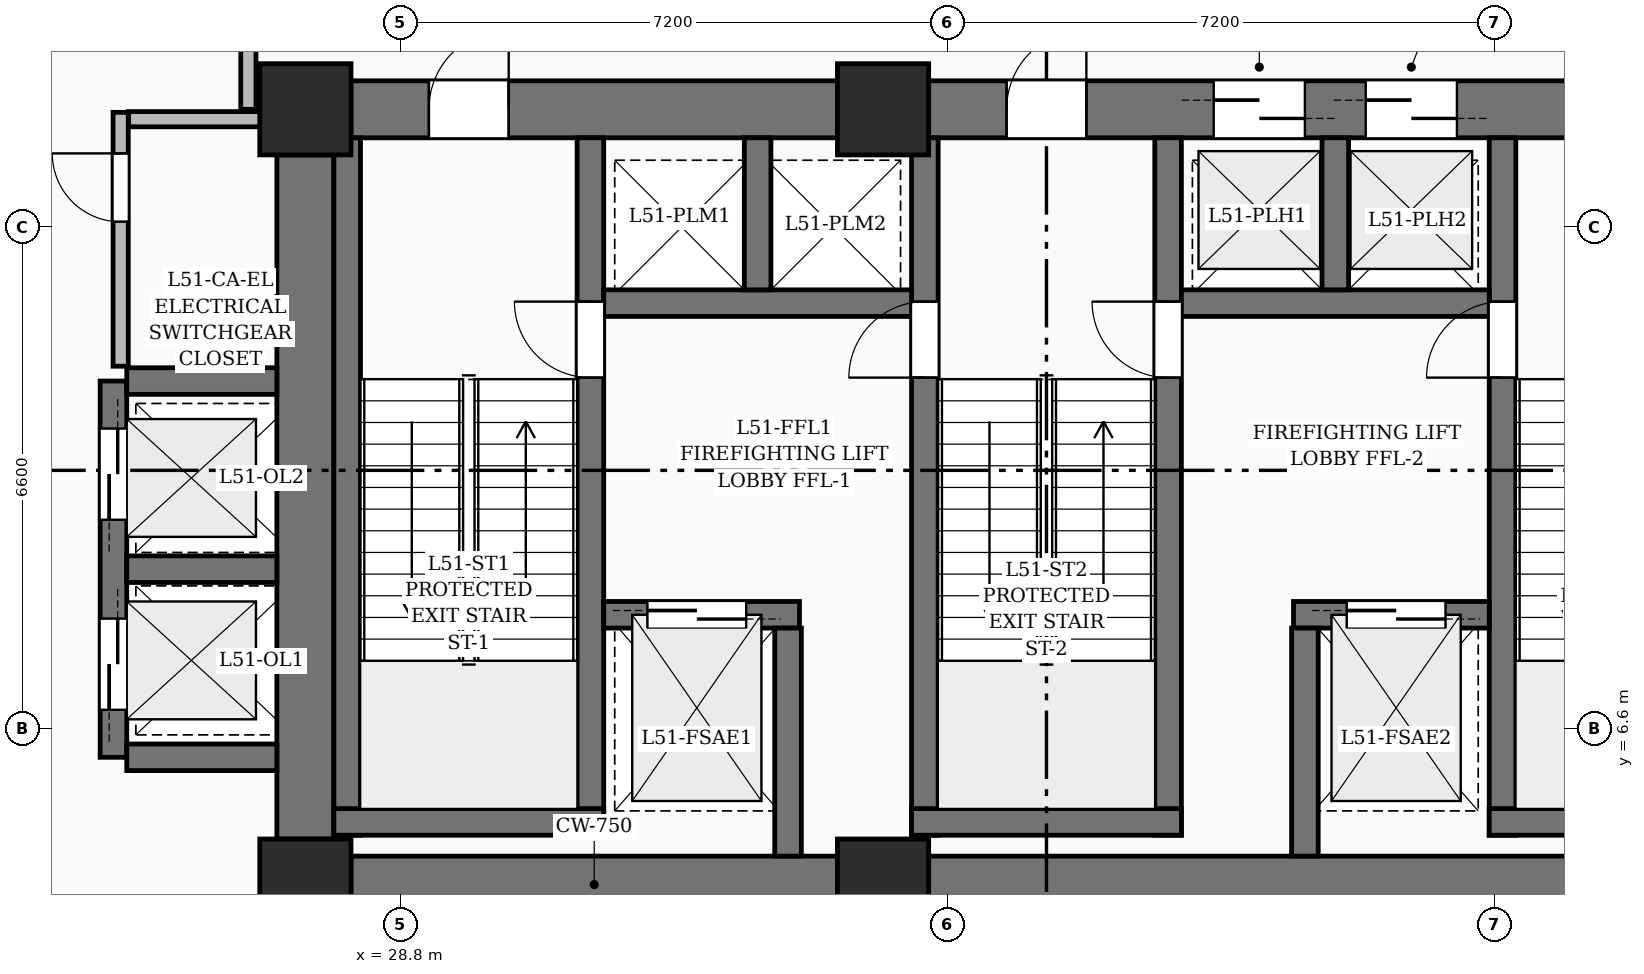
"""IFC4 building model, lengths in metres.
Left out: names, types, materials, properties, quantities, classifications, styles, units other than length and angle.
Written with IfcOpenShell. Run it as: python <this file> out.ifc"""

import sys

from ifc_helpers import new_model, si_unit, direction, frame, frame_2d, origin, origin_2d, place, context, subcontext, project, spatial, rectangle, extrude, element, fill, save


model = new_model("IFC4")
c1 = context("Model", 3, precision=1e-05, world=origin(), true_north=direction((0.0, 1.0)))
c2 = subcontext(c1, "Body", "Model", "MODEL_VIEW")
j1 = project(units=[si_unit("LENGTHUNIT", "METRE"), si_unit("PLANEANGLEUNIT", "RADIAN")], contexts=[c1])
p1 = place(None, origin())
s1 = spatial("IfcSite", under=j1, at=p1, CompositionType="ELEMENT")
p2 = place(p1, origin())
s2 = spatial("IfcBuilding", under=s1, at=p2, CompositionType="ELEMENT")
p3 = place(p2, frame((0.0, 0.0, 196.8)))
s3 = spatial("IfcBuildingStorey", under=s2, at=p3, CompositionType="ELEMENT", Elevation=196.8)
for number, where, z_axis, x_axis in (
    (1, (27.55, 4.55, 0.0), (0.0, 0.0, 1.0), (1.0, 0.0, 0.0)),
    (2, (35.15, 4.55, 0.0), (0.0, 0.0, 1.0), (1.0, 0.0, 0.0)),
    (3, (27.55, 14.75, 0.0), (0.0, 0.0, 1.0), (1.0, 0.0, 0.0)),
    (4, (35.15, 14.75, 0.0), (0.0, 0.0, 1.0), (1.0, 0.0, 0.0)),
):
    element("IfcColumn", number, at=place(p3, frame(where, z_axis=z_axis, x_axis=x_axis)), inside=s3, PredefinedType="COLUMN", context=c2, shape_type="SweptSolid", body=[
        extrude(rectangle(XDim=1.2, YDim=1.2, at=origin_2d()), origin(), (0.0, 0.0, 1.0), 4.8),
    ])
p4 = place(p3, frame((28.15, 4.55, 0.0), z_axis=(0.0, 0.0, 1.0), x_axis=(1.0, 0.0, 0.0)))
e5 = element("IfcWall", 5, at=p4, inside=s3, PredefinedType="SHEAR", context=c2, shape_type="SweptSolid", body=[
    extrude(rectangle(XDim=6.4, YDim=0.75, at=frame_2d((3.2, 0.0))), origin(), (0.0, 0.0, 1.0), 4.8),
])
p5 = place(p3, frame((35.75, 4.55, 0.0), z_axis=(0.0, 0.0, 1.0), x_axis=(1.0, 0.0, 0.0)))
e6 = element("IfcWall", 6, at=p5, inside=s3, PredefinedType="SHEAR", context=c2, shape_type="SweptSolid", body=[
    extrude(rectangle(XDim=10.7, YDim=0.75, at=frame_2d((5.35, 0.0))), origin(), (0.0, 0.0, 1.0), 4.8),
])
p6 = place(p3, frame((28.15, 14.75, 0.0), z_axis=(0.0, 0.0, 1.0), x_axis=(1.0, 0.0, 0.0)))
e7 = element("IfcWall", 7, at=p6, inside=s3, PredefinedType="SHEAR", context=c2, shape_type="SweptSolid", body=[
    extrude(rectangle(XDim=6.4, YDim=0.75, at=frame_2d((3.2, 0.0))), origin(), (0.0, 0.0, 1.0), 4.8),
])
p7 = place(p6, frame((1.025, 0.0, 0.0)))
e8 = element("IfcOpeningElement", 8, at=p7, cuts=e7, PredefinedType="OPENING", context=c2, shape_type="SweptSolid", body=[
    extrude(rectangle(XDim=1.05, YDim=2.15, at=frame_2d((0.525, 1.075))), frame((0.0, 0.385, 0.0), z_axis=(0.0, -1.0, 0.0), x_axis=(1.0, 0.0, 0.0)), (0.0, 0.0, 1.0), 0.77),
])
p8 = place(p3, frame((35.75, 14.75, 0.0), z_axis=(0.0, 0.0, 1.0), x_axis=(1.0, 0.0, 0.0)))
e9 = element("IfcWall", 9, at=p8, inside=s3, PredefinedType="SHEAR", context=c2, shape_type="SweptSolid", body=[
    extrude(rectangle(XDim=10.7, YDim=0.75, at=frame_2d((5.35, 0.0))), origin(), (0.0, 0.0, 1.0), 4.8),
])
p9 = place(p8, frame((1.025, 0.0, 0.0)))
e10 = element("IfcOpeningElement", 10, at=p9, cuts=e9, PredefinedType="OPENING", context=c2, shape_type="SweptSolid", body=[
    extrude(rectangle(XDim=1.05, YDim=2.15, at=frame_2d((0.525, 1.075))), frame((0.0, 0.385, 0.0), z_axis=(0.0, -1.0, 0.0), x_axis=(1.0, 0.0, 0.0)), (0.0, 0.0, 1.0), 0.77),
])
p10 = place(p8, frame((8.625, 0.0, 0.0)))
e11 = element("IfcOpeningElement", 11, at=p10, cuts=e9, PredefinedType="OPENING", context=c2, shape_type="SweptSolid", body=[
    extrude(rectangle(XDim=1.05, YDim=2.15, at=frame_2d((0.525, 1.075))), frame((0.0, 0.385, 0.0), z_axis=(0.0, -1.0, 0.0), x_axis=(1.0, 0.0, 0.0)), (0.0, 0.0, 1.0), 0.77),
])
p11 = place(p8, frame((3.75, 0.0, 0.0)))
e12 = element("IfcOpeningElement", 12, at=p11, cuts=e9, PredefinedType="OPENING", context=c2, shape_type="SweptSolid", body=[
    extrude(rectangle(XDim=1.2, YDim=2.2, at=frame_2d((0.6, 1.1))), frame((0.0, 0.385, 0.0), z_axis=(0.0, -1.0, 0.0), x_axis=(1.0, 0.0, 0.0)), (0.0, 0.0, 1.0), 0.77),
])
p12 = place(p8, frame((5.75, 0.0, 0.0)))
e13 = element("IfcOpeningElement", 13, at=p12, cuts=e9, PredefinedType="OPENING", context=c2, shape_type="SweptSolid", body=[
    extrude(rectangle(XDim=1.2, YDim=2.2, at=frame_2d((0.6, 1.1))), frame((0.0, 0.385, 0.0), z_axis=(0.0, -1.0, 0.0), x_axis=(1.0, 0.0, 0.0)), (0.0, 0.0, 1.0), 0.77),
])
p13 = place(p3, frame((27.55, 5.15, 0.0), z_axis=(0.0, 0.0, 1.0), x_axis=(0.0, 1.0, 0.0)))
e14 = element("IfcWall", 14, at=p13, inside=s3, PredefinedType="SHEAR", context=c2, shape_type="SweptSolid", body=[
    extrude(rectangle(XDim=9.0, YDim=0.75, at=frame_2d((4.5, 0.0))), origin(), (0.0, 0.0, 1.0), 4.8),
])
p14 = place(p3, frame((28.1, 5.2, 0.0), z_axis=(0.0, 0.0, 1.0), x_axis=(0.0, 1.0, 0.0)))
e15 = element("IfcWall", 15, at=p14, inside=s3, PredefinedType="SOLIDWALL", context=c2, shape_type="SweptSolid", body=[
    extrude(rectangle(XDim=9.175, YDim=0.35, at=frame_2d((4.587, 0.0))), origin(), (0.0, 0.0, 1.0), 4.8),
])
p15 = place(p3, frame((31.3, 5.2, 0.0), z_axis=(0.0, 0.0, 1.0), x_axis=(0.0, 1.0, 0.0)))
e16 = element("IfcWall", 16, at=p15, inside=s3, PredefinedType="SOLIDWALL", context=c2, shape_type="SweptSolid", body=[
    extrude(rectangle(XDim=9.175, YDim=0.35, at=frame_2d((4.587, 0.0))), origin(), (0.0, 0.0, 1.0), 4.8),
])
p16 = place(p15, frame((6.02, 0.0, 0.0)))
e17 = element("IfcOpeningElement", 17, at=p16, cuts=e16, PredefinedType="OPENING", context=c2, shape_type="SweptSolid", body=[
    extrude(rectangle(XDim=1.0, YDim=2.15, at=frame_2d((0.5, 1.075))), frame((0.0, 0.185, 0.0), z_axis=(0.0, -1.0, 0.0), x_axis=(1.0, 0.0, 0.0)), (0.0, 0.0, 1.0), 0.37),
])
p17 = place(p3, frame((27.925, 5.375, 0.0), z_axis=(0.0, 0.0, 1.0), x_axis=(1.0, 0.0, 0.0)))
e18 = element("IfcWall", 18, at=p17, inside=s3, PredefinedType="SOLIDWALL", context=c2, shape_type="SweptSolid", body=[
    extrude(rectangle(XDim=3.55, YDim=0.35, at=frame_2d((1.775, 0.0))), origin(), (0.0, 0.0, 1.0), 4.8),
])
p18 = place(p3, frame((35.7, 5.2, 0.0), z_axis=(0.0, 0.0, 1.0), x_axis=(0.0, 1.0, 0.0)))
e19 = element("IfcWall", 19, at=p18, inside=s3, PredefinedType="SOLIDWALL", context=c2, shape_type="SweptSolid", body=[
    extrude(rectangle(XDim=9.175, YDim=0.35, at=frame_2d((4.587, 0.0))), origin(), (0.0, 0.0, 1.0), 4.8),
])
p19 = place(p18, frame((6.02, 0.0, 0.0)))
e20 = element("IfcOpeningElement", 20, at=p19, cuts=e19, PredefinedType="OPENING", context=c2, shape_type="SweptSolid", body=[
    extrude(rectangle(XDim=1.0, YDim=2.15, at=frame_2d((0.5, 1.075))), frame((0.0, 0.185, 0.0), z_axis=(0.0, -1.0, 0.0), x_axis=(1.0, 0.0, 0.0)), (0.0, 0.0, 1.0), 0.37),
])
p20 = place(p3, frame((38.9, 5.2, 0.0), z_axis=(0.0, 0.0, 1.0), x_axis=(0.0, 1.0, 0.0)))
e21 = element("IfcWall", 21, at=p20, inside=s3, PredefinedType="SOLIDWALL", context=c2, shape_type="SweptSolid", body=[
    extrude(rectangle(XDim=9.175, YDim=0.35, at=frame_2d((4.587, 0.0))), origin(), (0.0, 0.0, 1.0), 4.8),
])
p21 = place(p20, frame((6.02, 0.0, 0.0)))
e22 = element("IfcOpeningElement", 22, at=p21, cuts=e21, PredefinedType="OPENING", context=c2, shape_type="SweptSolid", body=[
    extrude(rectangle(XDim=1.0, YDim=2.15, at=frame_2d((0.5, 1.075))), frame((0.0, 0.185, 0.0), z_axis=(0.0, -1.0, 0.0), x_axis=(1.0, 0.0, 0.0)), (0.0, 0.0, 1.0), 0.37),
])
p22 = place(p3, frame((35.525, 5.375, 0.0), z_axis=(0.0, 0.0, 1.0), x_axis=(1.0, 0.0, 0.0)))
e23 = element("IfcWall", 23, at=p22, inside=s3, PredefinedType="SOLIDWALL", context=c2, shape_type="SweptSolid", body=[
    extrude(rectangle(XDim=3.55, YDim=0.35, at=frame_2d((1.775, 0.0))), origin(), (0.0, 0.0, 1.0), 4.8),
])
p23 = place(p3, frame((43.3, 5.2, 0.0), z_axis=(0.0, 0.0, 1.0), x_axis=(0.0, 1.0, 0.0)))
e24 = element("IfcWall", 24, at=p23, inside=s3, PredefinedType="SOLIDWALL", context=c2, shape_type="SweptSolid", body=[
    extrude(rectangle(XDim=9.175, YDim=0.35, at=frame_2d((4.587, 0.0))), origin(), (0.0, 0.0, 1.0), 4.8),
])
p24 = place(p23, frame((6.02, 0.0, 0.0)))
e25 = element("IfcOpeningElement", 25, at=p24, cuts=e24, PredefinedType="OPENING", context=c2, shape_type="SweptSolid", body=[
    extrude(rectangle(XDim=1.0, YDim=2.15, at=frame_2d((0.5, 1.075))), frame((0.0, 0.185, 0.0), z_axis=(0.0, -1.0, 0.0), x_axis=(1.0, 0.0, 0.0)), (0.0, 0.0, 1.0), 0.37),
])
p25 = place(p3, frame((43.125, 5.375, 0.0), z_axis=(0.0, 0.0, 1.0), x_axis=(1.0, 0.0, 0.0)))
e26 = element("IfcWall", 26, at=p25, inside=s3, PredefinedType="SOLIDWALL", context=c2, shape_type="SweptSolid", body=[
    extrude(rectangle(XDim=3.55, YDim=0.35, at=frame_2d((1.775, 0.0))), origin(), (0.0, 0.0, 1.0), 4.8),
])
p26 = place(p3, frame((31.475, 8.1, 0.0), z_axis=(0.0, 0.0, 1.0), x_axis=(1.0, 0.0, 0.0)))
e27 = element("IfcWall", 27, at=p26, inside=s3, PredefinedType="SOLIDWALL", context=c2, shape_type="SweptSolid", body=[
    extrude(rectangle(XDim=2.575, YDim=0.35, at=frame_2d((1.288, 0.0))), origin(), (0.0, 0.0, 1.0), 4.8),
])
p27 = place(p26, frame((0.575, 0.0, 0.0)))
e28 = element("IfcOpeningElement", 28, at=p27, cuts=e27, PredefinedType="OPENING", context=c2, shape_type="SweptSolid", body=[
    extrude(rectangle(XDim=1.3, YDim=2.25, at=frame_2d((0.65, 1.125))), frame((0.0, 0.185, 0.0), z_axis=(0.0, -1.0, 0.0), x_axis=(1.0, 0.0, 0.0)), (0.0, 0.0, 1.0), 0.37),
])
p28 = place(p3, frame((40.55, 8.1, 0.0), z_axis=(0.0, 0.0, 1.0), x_axis=(1.0, 0.0, 0.0)))
e29 = element("IfcWall", 29, at=p28, inside=s3, PredefinedType="SOLIDWALL", context=c2, shape_type="SweptSolid", body=[
    extrude(rectangle(XDim=2.575, YDim=0.35, at=frame_2d((1.288, 0.0))), origin(), (0.0, 0.0, 1.0), 4.8),
])
p29 = place(p28, frame((0.7, 0.0, 0.0)))
e30 = element("IfcOpeningElement", 30, at=p29, cuts=e29, PredefinedType="OPENING", context=c2, shape_type="SweptSolid", body=[
    extrude(rectangle(XDim=1.3, YDim=2.25, at=frame_2d((0.65, 1.125))), frame((0.0, 0.185, 0.0), z_axis=(0.0, -1.0, 0.0), x_axis=(1.0, 0.0, 0.0)), (0.0, 0.0, 1.0), 0.37),
])
for number, where, z_axis, x_axis in (
    (31, (33.9, 4.925, 0.0), (0.0, 0.0, 1.0), (0.0, 1.0, 0.0)),
    (32, (40.7, 4.925, 0.0), (0.0, 0.0, 1.0), (0.0, 1.0, 0.0)),
):
    element("IfcWall", number, at=place(p3, frame(where, z_axis=z_axis, x_axis=x_axis)), inside=s3, PredefinedType="SOLIDWALL", context=c2, shape_type="SweptSolid", body=[
        extrude(rectangle(XDim=3.0, YDim=0.35, at=frame_2d((1.5, 0.0))), origin(), (0.0, 0.0, 1.0), 4.8),
    ])
p30 = place(p3, frame((31.475, 12.2, 0.0), z_axis=(0.0, 0.0, 1.0), x_axis=(1.0, 0.0, 0.0)))
e33 = element("IfcWall", 33, at=p30, inside=s3, PredefinedType="SOLIDWALL", context=c2, shape_type="SweptSolid", body=[
    extrude(rectangle(XDim=4.05, YDim=0.35, at=frame_2d((2.025, 0.0))), origin(), (0.0, 0.0, 1.0), 4.8),
])
p31 = place(p3, frame((33.5, 12.375, 0.0), z_axis=(0.0, 0.0, 1.0), x_axis=(0.0, 1.0, 0.0)))
e34 = element("IfcWall", 34, at=p31, inside=s3, PredefinedType="SOLIDWALL", context=c2, shape_type="SweptSolid", body=[
    extrude(rectangle(XDim=2.0, YDim=0.35, at=frame_2d((1.0, 0.0))), origin(), (0.0, 0.0, 1.0), 4.8),
])
p32 = place(p3, frame((39.075, 12.2, 0.0), z_axis=(0.0, 0.0, 1.0), x_axis=(1.0, 0.0, 0.0)))
e35 = element("IfcWall", 35, at=p32, inside=s3, PredefinedType="SOLIDWALL", context=c2, shape_type="SweptSolid", body=[
    extrude(rectangle(XDim=4.05, YDim=0.35, at=frame_2d((2.025, 0.0))), origin(), (0.0, 0.0, 1.0), 4.8),
])
p33 = place(p3, frame((41.1, 12.375, 0.0), z_axis=(0.0, 0.0, 1.0), x_axis=(0.0, 1.0, 0.0)))
e36 = element("IfcWall", 36, at=p33, inside=s3, PredefinedType="SOLIDWALL", context=c2, shape_type="SweptSolid", body=[
    extrude(rectangle(XDim=2.0, YDim=0.35, at=frame_2d((1.0, 0.0))), origin(), (0.0, 0.0, 1.0), 4.8),
])
p34 = place(p3, frame((25.025, 6.225, 0.0), z_axis=(0.0, 0.0, 1.0), x_axis=(0.0, 1.0, 0.0)))
e37 = element("IfcWall", 37, at=p34, inside=s3, PredefinedType="SOLIDWALL", context=c2, shape_type="SweptSolid", body=[
    extrude(rectangle(XDim=4.95, YDim=0.35, at=frame_2d((2.475, 0.0))), origin(), (0.0, 0.0, 1.0), 4.8),
])
p35 = place(p34, frame((0.625, 0.0, 0.0)))
e38 = element("IfcOpeningElement", 38, at=p35, cuts=e37, PredefinedType="OPENING", context=c2, shape_type="SweptSolid", body=[
    extrude(rectangle(XDim=1.2, YDim=2.2, at=frame_2d((0.6, 1.1))), frame((0.0, 0.185, 0.0), z_axis=(0.0, -1.0, 0.0), x_axis=(1.0, 0.0, 0.0)), (0.0, 0.0, 1.0), 0.37),
])
p36 = place(p34, frame((3.125, 0.0, 0.0)))
e39 = element("IfcOpeningElement", 39, at=p36, cuts=e37, PredefinedType="OPENING", context=c2, shape_type="SweptSolid", body=[
    extrude(rectangle(XDim=1.2, YDim=2.2, at=frame_2d((0.6, 1.1))), frame((0.0, 0.185, 0.0), z_axis=(0.0, -1.0, 0.0), x_axis=(1.0, 0.0, 0.0)), (0.0, 0.0, 1.0), 0.37),
])
for number, where, z_axis, x_axis in (
    (40, (25.2, 6.225, 0.0), (0.0, 0.0, 1.0), (1.0, 0.0, 0.0)),
    (41, (25.2, 8.7, 0.0), (0.0, 0.0, 1.0), (1.0, 0.0, 0.0)),
    (42, (25.2, 11.175, 0.0), (0.0, 0.0, 1.0), (1.0, 0.0, 0.0)),
):
    element("IfcWall", number, at=place(p3, frame(where, z_axis=z_axis, x_axis=x_axis)), inside=s3, PredefinedType="SOLIDWALL", context=c2, shape_type="SweptSolid", body=[
        extrude(rectangle(XDim=1.975, YDim=0.35, at=frame_2d((0.988, 0.0))), origin(), (0.0, 0.0, 1.0), 4.8),
    ])
p37 = place(p3, frame((25.12, 11.37, 0.0), z_axis=(0.0, 0.0, 1.0), x_axis=(0.0, 1.0, 0.0)))
e43 = element("IfcWall", 43, at=p37, inside=s3, PredefinedType="PARTITIONING", context=c2, shape_type="SweptSolid", body=[
    extrude(rectangle(XDim=3.34, YDim=0.2, at=frame_2d((1.67, 0.0))), origin(), (0.0, 0.0, 1.0), 4.5),
])
p38 = place(p37, frame((1.9, 0.0, 0.0)))
e44 = element("IfcOpeningElement", 44, at=p38, cuts=e43, PredefinedType="OPENING", context=c2, shape_type="SweptSolid", body=[
    extrude(rectangle(XDim=0.9, YDim=2.1, at=frame_2d((0.45, 1.05))), frame((0.0, 0.11, 0.0), z_axis=(0.0, -1.0, 0.0), x_axis=(1.0, 0.0, 0.0)), (0.0, 0.0, 1.0), 0.22),
])
p39 = place(p3, frame((25.225, 14.62, 0.0), z_axis=(0.0, 0.0, 1.0), x_axis=(1.0, 0.0, 0.0)))
e45 = element("IfcWall", 45, at=p39, inside=s3, PredefinedType="PARTITIONING", context=c2, shape_type="SweptSolid", body=[
    extrude(rectangle(XDim=1.935, YDim=0.2, at=frame_2d((0.967, 0.0))), origin(), (0.0, 0.0, 1.0), 4.5),
])
p40 = place(p3, frame((26.8, 16.965, 0.0), z_axis=(0.0, 0.0, 1.0), x_axis=(0.0, -1.0, 0.0)))
e46 = element("IfcWall", 46, at=p40, inside=s3, PredefinedType="PARTITIONING", context=c2, shape_type="SweptSolid", body=[
    extrude(rectangle(XDim=2.215, YDim=0.2, at=frame_2d((1.107, 0.0))), origin(), (0.0, 0.0, 1.0), 2.27),
])
p41 = place(p7, origin())
e47 = element("IfcDoor", 47, at=p41, inside=s3, OperationType="SINGLE_SWING_RIGHT", PredefinedType="DOOR", context=c2, shape_type="SweptSolid", body=[
    extrude(rectangle(XDim=1.05, YDim=2.15, at=frame_2d((0.525, 1.075))), frame((0.0, 0.025, 0.0), z_axis=(0.0, -1.0, 0.0), x_axis=(1.0, 0.0, 0.0)), (0.0, 0.0, 1.0), 0.05),
])
fill(e8, e47)
p42 = place(p9, origin())
e48 = element("IfcDoor", 48, at=p42, inside=s3, OperationType="SINGLE_SWING_RIGHT", PredefinedType="DOOR", context=c2, shape_type="SweptSolid", body=[
    extrude(rectangle(XDim=1.05, YDim=2.15, at=frame_2d((0.525, 1.075))), frame((0.0, 0.025, 0.0), z_axis=(0.0, -1.0, 0.0), x_axis=(1.0, 0.0, 0.0)), (0.0, 0.0, 1.0), 0.05),
])
fill(e10, e48)
p43 = place(p16, origin())
e49 = element("IfcDoor", 49, at=p43, inside=s3, OperationType="SINGLE_SWING_RIGHT", PredefinedType="DOOR", context=c2, shape_type="SweptSolid", body=[
    extrude(rectangle(XDim=1.0, YDim=2.15, at=frame_2d((0.5, 1.075))), frame((0.0, 0.025, 0.0), z_axis=(0.0, -1.0, 0.0), x_axis=(1.0, 0.0, 0.0)), (0.0, 0.0, 1.0), 0.05),
])
fill(e17, e49)
p44 = place(p19, origin())
e50 = element("IfcDoor", 50, at=p44, inside=s3, OperationType="SINGLE_SWING_LEFT", PredefinedType="DOOR", context=c2, shape_type="SweptSolid", body=[
    extrude(rectangle(XDim=1.0, YDim=2.15, at=frame_2d((0.5, 1.075))), frame((0.0, 0.025, 0.0), z_axis=(0.0, -1.0, 0.0), x_axis=(1.0, 0.0, 0.0)), (0.0, 0.0, 1.0), 0.05),
])
fill(e20, e50)
p45 = place(p21, origin())
e51 = element("IfcDoor", 51, at=p45, inside=s3, OperationType="SINGLE_SWING_RIGHT", PredefinedType="DOOR", context=c2, shape_type="SweptSolid", body=[
    extrude(rectangle(XDim=1.0, YDim=2.15, at=frame_2d((0.5, 1.075))), frame((0.0, 0.025, 0.0), z_axis=(0.0, -1.0, 0.0), x_axis=(1.0, 0.0, 0.0)), (0.0, 0.0, 1.0), 0.05),
])
fill(e22, e51)
p46 = place(p24, origin())
e52 = element("IfcDoor", 52, at=p46, inside=s3, OperationType="SINGLE_SWING_LEFT", PredefinedType="DOOR", context=c2, shape_type="SweptSolid", body=[
    extrude(rectangle(XDim=1.0, YDim=2.15, at=frame_2d((0.5, 1.075))), frame((0.0, 0.025, 0.0), z_axis=(0.0, -1.0, 0.0), x_axis=(1.0, 0.0, 0.0)), (0.0, 0.0, 1.0), 0.05),
])
fill(e25, e52)
p47 = place(p27, origin())
e53 = element("IfcDoor", 53, at=p47, inside=s3, OperationType="DOUBLE_DOOR_SLIDING", PredefinedType="DOOR", context=c2, shape_type="SweptSolid", body=[
    extrude(rectangle(XDim=1.3, YDim=2.25, at=frame_2d((0.65, 1.125))), frame((0.0, 0.025, 0.0), z_axis=(0.0, -1.0, 0.0), x_axis=(1.0, 0.0, 0.0)), (0.0, 0.0, 1.0), 0.05),
])
fill(e28, e53)
p48 = place(p29, origin())
e54 = element("IfcDoor", 54, at=p48, inside=s3, OperationType="DOUBLE_DOOR_SLIDING", PredefinedType="DOOR", context=c2, shape_type="SweptSolid", body=[
    extrude(rectangle(XDim=1.3, YDim=2.25, at=frame_2d((0.65, 1.125))), frame((0.0, 0.025, 0.0), z_axis=(0.0, -1.0, 0.0), x_axis=(1.0, 0.0, 0.0)), (0.0, 0.0, 1.0), 0.05),
])
fill(e30, e54)
p49 = place(p11, origin())
e55 = element("IfcDoor", 55, at=p49, inside=s3, OperationType="DOUBLE_DOOR_SLIDING", PredefinedType="DOOR", context=c2, shape_type="SweptSolid", body=[
    extrude(rectangle(XDim=1.2, YDim=2.2, at=frame_2d((0.6, 1.1))), frame((0.0, 0.025, 0.0), z_axis=(0.0, -1.0, 0.0), x_axis=(1.0, 0.0, 0.0)), (0.0, 0.0, 1.0), 0.05),
])
fill(e12, e55)
p50 = place(p12, origin())
e56 = element("IfcDoor", 56, at=p50, inside=s3, OperationType="DOUBLE_DOOR_SLIDING", PredefinedType="DOOR", context=c2, shape_type="SweptSolid", body=[
    extrude(rectangle(XDim=1.2, YDim=2.2, at=frame_2d((0.6, 1.1))), frame((0.0, 0.025, 0.0), z_axis=(0.0, -1.0, 0.0), x_axis=(1.0, 0.0, 0.0)), (0.0, 0.0, 1.0), 0.05),
])
fill(e13, e56)
p51 = place(p35, origin())
e57 = element("IfcDoor", 57, at=p51, inside=s3, OperationType="DOUBLE_DOOR_SLIDING", PredefinedType="DOOR", context=c2, shape_type="SweptSolid", body=[
    extrude(rectangle(XDim=1.2, YDim=2.2, at=frame_2d((0.6, 1.1))), frame((0.0, 0.025, 0.0), z_axis=(0.0, -1.0, 0.0), x_axis=(1.0, 0.0, 0.0)), (0.0, 0.0, 1.0), 0.05),
])
fill(e38, e57)
p52 = place(p36, origin())
e58 = element("IfcDoor", 58, at=p52, inside=s3, OperationType="DOUBLE_DOOR_SLIDING", PredefinedType="DOOR", context=c2, shape_type="SweptSolid", body=[
    extrude(rectangle(XDim=1.2, YDim=2.2, at=frame_2d((0.6, 1.1))), frame((0.0, 0.025, 0.0), z_axis=(0.0, -1.0, 0.0), x_axis=(1.0, 0.0, 0.0)), (0.0, 0.0, 1.0), 0.05),
])
fill(e39, e58)
p53 = place(p38, origin())
e59 = element("IfcDoor", 59, at=p53, inside=s3, OperationType="SINGLE_SWING_RIGHT", PredefinedType="DOOR", context=c2, shape_type="SweptSolid", body=[
    extrude(rectangle(XDim=0.9, YDim=2.1, at=frame_2d((0.45, 1.05))), frame((0.0, 0.025, 0.0), z_axis=(0.0, -1.0, 0.0), x_axis=(1.0, 0.0, 0.0)), (0.0, 0.0, 1.0), 0.05),
])
fill(e44, e59)
save(model, sys.argv[1])
